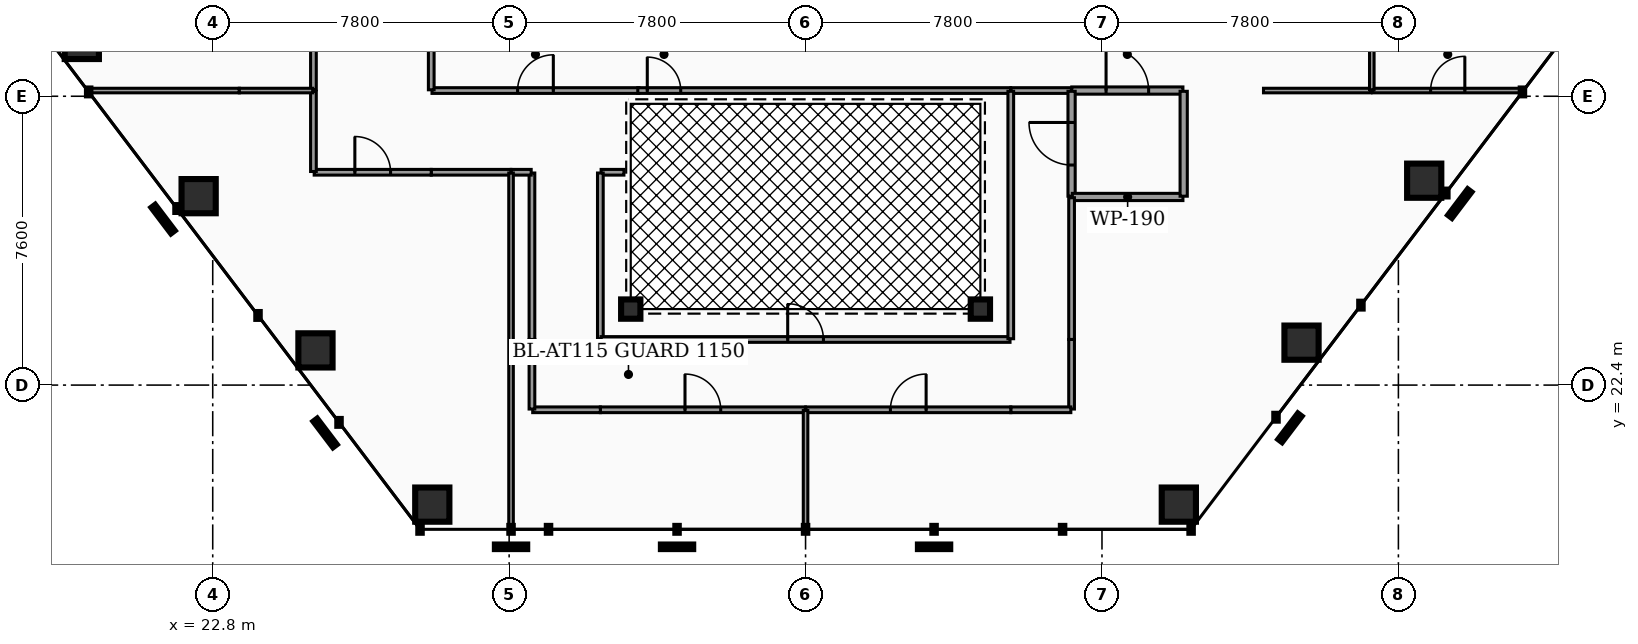
"""IFC4 building model, lengths in metres.
Left out: names, types, materials, properties, quantities, classifications, styles, units other than length and angle.
Written with IfcOpenShell. Run it as: python <this file> out.ifc"""

import sys

from ifc_helpers import new_model, si_unit, direction, frame, frame_2d, origin, origin_2d, place, context, subcontext, project, spatial, rectangle, hollow_rectangle, hollow_circle, extrude, element, fill, save


model = new_model("IFC4")
c1 = context("Model", 3, precision=1e-05, world=origin(), true_north=direction((0.0, 1.0)))
c2 = subcontext(c1, "Body", "Model", "MODEL_VIEW")
j1 = project(units=[si_unit("LENGTHUNIT", "METRE"), si_unit("PLANEANGLEUNIT", "RADIAN")], contexts=[c1])
p1 = place(None, origin())
s1 = spatial("IfcSite", under=j1, at=p1, CompositionType="ELEMENT")
p2 = place(p1, origin())
s2 = spatial("IfcBuilding", under=s1, at=p2, CompositionType="ELEMENT")
p3 = place(p2, frame((0.0, 0.0, 72.42)))
s3 = spatial("IfcBuildingStorey", under=s2, at=p3, CompositionType="ELEMENT", Elevation=72.42)
for number, where, z_axis, x_axis in (
    (1, (19.355, 31.429, 0.0), (0.0, 0.0, 1.0), (1.0, 0.0, 0.0)),
    (2, (22.429, 27.371, 0.0), (0.0, 0.0, 1.0), (1.0, 0.0, 0.0)),
    (3, (25.504, 23.313, 0.0), (0.0, 0.0, 1.0), (1.0, 0.0, 0.0)),
    (4, (28.578, 19.255, 0.0), (0.0, 0.0, 1.0), (1.0, 0.0, 0.0)),
    (5, (48.222, 19.255, 0.0), (0.0, 0.0, 1.0), (1.0, 0.0, 0.0)),
    (6, (51.451, 23.517, 0.0), (0.0, 0.0, 1.0), (1.0, 0.0, 0.0)),
    (7, (54.679, 27.778, 0.0), (0.0, 0.0, 1.0), (1.0, 0.0, 0.0)),
):
    element("IfcColumn", number, at=place(p3, frame(where, z_axis=z_axis, x_axis=x_axis)), inside=s3, PredefinedType="COLUMN", context=c2, shape_type="SweptSolid", body=[
        extrude(hollow_rectangle(XDim=0.9, YDim=0.9, WallThickness=0.045, at=origin_2d()), origin(), (0.0, 0.0, 1.0), 3.82),
    ])
for number, where, z_axis, x_axis in (
    (8, (33.8, 24.4, 0.0), (0.0, 0.0, 1.0), (1.0, 0.0, 0.0)),
    (9, (43.0, 24.4, 0.0), (0.0, 0.0, 1.0), (1.0, 0.0, 0.0)),
):
    element("IfcColumn", number, at=place(p3, frame(where, z_axis=z_axis, x_axis=x_axis)), inside=s3, PredefinedType="COLUMN", context=c2, shape_type="SweptSolid", body=[
        extrude(hollow_circle(Radius=0.254, WallThickness=0.02, at=origin_2d()), origin(), (0.0, 0.0, 1.0), 3.82),
    ])
p4 = place(p3, frame((45.405, 30.15, 0.0), z_axis=(0.0, 0.0, 1.0), x_axis=(1.0, 0.0, 0.0)))
e10 = element("IfcWall", 10, at=p4, inside=s3, PredefinedType="PARTITIONING", context=c2, shape_type="SweptSolid", body=[
    extrude(rectangle(XDim=2.925, YDim=0.19, at=frame_2d((1.462, 0.0))), origin(), (0.0, 0.0, 1.0), 2.777),
])
p5 = place(p4, frame((0.903, 0.0, 0.0)))
e11 = element("IfcOpeningElement", 11, at=p5, cuts=e10, PredefinedType="OPENING", context=c2, shape_type="SweptSolid", body=[
    extrude(rectangle(XDim=1.12, YDim=2.05, at=frame_2d((0.56, 1.025))), frame((0.0, 0.105, 0.0), z_axis=(0.0, -1.0, 0.0), x_axis=(1.0, 0.0, 0.0)), (0.0, 0.0, 1.0), 0.21),
])
p6 = place(p3, frame((43.805, 30.15, 0.0), z_axis=(0.0, 0.0, 1.0), x_axis=(1.0, 0.0, 0.0)))
e12 = element("IfcWall", 12, at=p6, inside=s3, PredefinedType="PARTITIONING", context=c2, shape_type="SweptSolid", body=[
    extrude(rectangle(XDim=1.59, YDim=0.15, at=frame_2d((0.795, 0.0))), origin(), (0.0, 0.0, 1.0), 2.777),
])
p7 = place(p3, frame((28.57, 30.15, 0.0), z_axis=(0.0, 0.0, 1.0), x_axis=(1.0, 0.0, 0.0)))
e13 = element("IfcWall", 13, at=p7, inside=s3, PredefinedType="PARTITIONING", context=c2, shape_type="SweptSolid", body=[
    extrude(rectangle(XDim=5.445, YDim=0.15, at=frame_2d((2.722, 0.0))), origin(), (0.0, 0.0, 1.0), 2.777),
])
p8 = place(p7, frame((2.252, 0.0, 0.0)))
e14 = element("IfcOpeningElement", 14, at=p8, cuts=e13, PredefinedType="OPENING", context=c2, shape_type="SweptSolid", body=[
    extrude(rectangle(XDim=0.94, YDim=2.05, at=frame_2d((0.47, 1.025))), frame((0.0, 0.085, 0.0), z_axis=(0.0, -1.0, 0.0), x_axis=(1.0, 0.0, 0.0)), (0.0, 0.0, 1.0), 0.17),
])
p9 = place(p3, frame((28.55, 30.17, 0.0), z_axis=(0.0, 0.0, 1.0), x_axis=(0.0, 1.0, 0.0)))
e15 = element("IfcWall", 15, at=p9, inside=s3, PredefinedType="PARTITIONING", context=c2, shape_type="SweptSolid", body=[
    extrude(rectangle(XDim=3.065, YDim=0.15, at=frame_2d((1.533, 0.0))), origin(), (0.0, 0.0, 1.0), 2.777),
])
p10 = place(p3, frame((33.985, 30.15, 0.0), z_axis=(0.0, 0.0, 1.0), x_axis=(1.0, 0.0, 0.0)))
e16 = element("IfcWall", 16, at=p10, inside=s3, PredefinedType="PARTITIONING", context=c2, shape_type="SweptSolid", body=[
    extrude(rectangle(XDim=9.81, YDim=0.15, at=frame_2d((4.905, 0.0))), origin(), (0.0, 0.0, 1.0), 2.777),
])
p11 = place(p10, frame((0.25, 0.0, 0.0)))
e17 = element("IfcOpeningElement", 17, at=p11, cuts=e16, PredefinedType="OPENING", context=c2, shape_type="SweptSolid", body=[
    extrude(rectangle(XDim=0.88, YDim=2.05, at=frame_2d((0.44, 1.025))), frame((0.0, 0.085, 0.0), z_axis=(0.0, -1.0, 0.0), x_axis=(1.0, 0.0, 0.0)), (0.0, 0.0, 1.0), 0.17),
])
p12 = place(p3, frame((45.4, 27.37, 0.0), z_axis=(0.0, 0.0, 1.0), x_axis=(0.0, 1.0, 0.0)))
e18 = element("IfcWall", 18, at=p12, inside=s3, PredefinedType="PARTITIONING", context=c2, shape_type="SweptSolid", body=[
    extrude(rectangle(XDim=2.76, YDim=0.19, at=frame_2d((1.38, 0.0))), origin(), (0.0, 0.0, 1.0), 2.777),
])
p13 = place(p12, frame((0.82, 0.0, 0.0)))
e19 = element("IfcOpeningElement", 19, at=p13, cuts=e18, PredefinedType="OPENING", context=c2, shape_type="SweptSolid", body=[
    extrude(rectangle(XDim=1.12, YDim=2.05, at=frame_2d((0.56, 1.025))), frame((0.0, 0.105, 0.0), z_axis=(0.0, -1.0, 0.0), x_axis=(1.0, 0.0, 0.0)), (0.0, 0.0, 1.0), 0.21),
])
p14 = place(p3, frame((45.42, 27.35, 0.0), z_axis=(0.0, 0.0, 1.0), x_axis=(1.0, 0.0, 0.0)))
e20 = element("IfcWall", 20, at=p14, inside=s3, PredefinedType="PARTITIONING", context=c2, shape_type="SweptSolid", body=[
    extrude(rectangle(XDim=2.91, YDim=0.19, at=frame_2d((1.455, 0.0))), origin(), (0.0, 0.0, 1.0), 2.777),
])
p15 = place(p3, frame((48.35, 27.37, 0.0), z_axis=(0.0, 0.0, 1.0), x_axis=(0.0, 1.0, 0.0)))
e21 = element("IfcWall", 21, at=p15, inside=s3, PredefinedType="PARTITIONING", context=c2, shape_type="SweptSolid", body=[
    extrude(rectangle(XDim=2.76, YDim=0.19, at=frame_2d((1.38, 0.0))), origin(), (0.0, 0.0, 1.0), 2.777),
])
p16 = place(p3, frame((33.0, 21.75, 0.0), z_axis=(0.0, 0.0, 1.0), x_axis=(1.0, 0.0, 0.0)))
e22 = element("IfcWall", 22, at=p16, inside=s3, PredefinedType="PARTITIONING", context=c2, shape_type="SweptSolid", body=[
    extrude(rectangle(XDim=5.395, YDim=0.15, at=frame_2d((2.698, 0.0))), origin(), (0.0, 0.0, 1.0), 2.777),
])
p17 = place(p16, frame((2.228, 0.0, 0.0)))
e23 = element("IfcOpeningElement", 23, at=p17, cuts=e22, PredefinedType="OPENING", context=c2, shape_type="SweptSolid", body=[
    extrude(rectangle(XDim=0.94, YDim=2.05, at=frame_2d((0.47, 1.025))), frame((0.0, 0.085, 0.0), z_axis=(0.0, -1.0, 0.0), x_axis=(1.0, 0.0, 0.0)), (0.0, 0.0, 1.0), 0.17),
])
p18 = place(p3, frame((31.22, 21.75, 0.0), z_axis=(0.0, 0.0, 1.0), x_axis=(1.0, 0.0, 0.0)))
e24 = element("IfcWall", 24, at=p18, inside=s3, PredefinedType="PARTITIONING", context=c2, shape_type="SweptSolid", body=[
    extrude(rectangle(XDim=1.78, YDim=0.15, at=frame_2d((0.89, 0.0))), origin(), (0.0, 0.0, 1.0), 2.777),
])
p19 = place(p3, frame((31.2, 21.77, 0.0), z_axis=(0.0, 0.0, 1.0), x_axis=(0.0, 1.0, 0.0)))
e25 = element("IfcWall", 25, at=p19, inside=s3, PredefinedType="PARTITIONING", context=c2, shape_type="SweptSolid", body=[
    extrude(rectangle(XDim=1.83, YDim=0.15, at=frame_2d((0.915, 0.0))), origin(), (0.0, 0.0, 1.0), 2.777),
])
p20 = place(p3, frame((31.2, 23.6, 0.0), z_axis=(0.0, 0.0, 1.0), x_axis=(0.0, 1.0, 0.0)))
e26 = element("IfcWall", 26, at=p20, inside=s3, PredefinedType="PARTITIONING", context=c2, shape_type="SweptSolid", body=[
    extrude(rectangle(XDim=4.38, YDim=0.15, at=frame_2d((2.19, 0.0))), origin(), (0.0, 0.0, 1.0), 2.777),
])
p21 = place(p3, frame((30.655, 28.0, 0.0), z_axis=(0.0, 0.0, 1.0), x_axis=(1.0, 0.0, 0.0)))
e27 = element("IfcWall", 27, at=p21, inside=s3, PredefinedType="PARTITIONING", context=c2, shape_type="SweptSolid", body=[
    extrude(rectangle(XDim=0.525, YDim=0.15, at=frame_2d((0.262, 0.0))), origin(), (0.0, 0.0, 1.0), 2.777),
])
p22 = place(p3, frame((45.4, 23.6, 0.0), z_axis=(0.0, 0.0, 1.0), x_axis=(0.0, 1.0, 0.0)))
e28 = element("IfcWall", 28, at=p22, inside=s3, PredefinedType="PARTITIONING", context=c2, shape_type="SweptSolid", body=[
    extrude(rectangle(XDim=3.73, YDim=0.15, at=frame_2d((1.865, 0.0))), origin(), (0.0, 0.0, 1.0), 2.777),
])
p23 = place(p3, frame((45.4, 21.77, 0.0), z_axis=(0.0, 0.0, 1.0), x_axis=(0.0, 1.0, 0.0)))
e29 = element("IfcWall", 29, at=p23, inside=s3, PredefinedType="PARTITIONING", context=c2, shape_type="SweptSolid", body=[
    extrude(rectangle(XDim=1.83, YDim=0.15, at=frame_2d((0.915, 0.0))), origin(), (0.0, 0.0, 1.0), 2.777),
])
p24 = place(p3, frame((43.8, 21.75, 0.0), z_axis=(0.0, 0.0, 1.0), x_axis=(1.0, 0.0, 0.0)))
e30 = element("IfcWall", 30, at=p24, inside=s3, PredefinedType="PARTITIONING", context=c2, shape_type="SweptSolid", body=[
    extrude(rectangle(XDim=1.58, YDim=0.15, at=frame_2d((0.79, 0.0))), origin(), (0.0, 0.0, 1.0), 2.777),
])
p25 = place(p3, frame((38.405, 21.75, 0.0), z_axis=(0.0, 0.0, 1.0), x_axis=(1.0, 0.0, 0.0)))
e31 = element("IfcWall", 31, at=p25, inside=s3, PredefinedType="PARTITIONING", context=c2, shape_type="SweptSolid", body=[
    extrude(rectangle(XDim=5.395, YDim=0.15, at=frame_2d((2.698, 0.0))), origin(), (0.0, 0.0, 1.0), 2.777),
])
p26 = place(p25, frame((2.228, 0.0, 0.0)))
e32 = element("IfcOpeningElement", 32, at=p26, cuts=e31, PredefinedType="OPENING", context=c2, shape_type="SweptSolid", body=[
    extrude(rectangle(XDim=0.94, YDim=2.05, at=frame_2d((0.47, 1.025))), frame((0.0, 0.085, 0.0), z_axis=(0.0, -1.0, 0.0), x_axis=(1.0, 0.0, 0.0)), (0.0, 0.0, 1.0), 0.17),
])
p27 = place(p3, frame((28.55, 28.0, 0.0), z_axis=(0.0, 0.0, 1.0), x_axis=(1.0, 0.0, 0.0)))
e33 = element("IfcWall", 33, at=p27, inside=s3, PredefinedType="PARTITIONING", context=c2, shape_type="SweptSolid", body=[
    extrude(rectangle(XDim=2.095, YDim=0.15, at=frame_2d((1.047, 0.0))), origin(), (0.0, 0.0, 1.0), 2.777),
])
p28 = place(p3, frame((25.47, 28.0, 0.0), z_axis=(0.0, 0.0, 1.0), x_axis=(1.0, 0.0, 0.0)))
e34 = element("IfcWall", 34, at=p28, inside=s3, PredefinedType="PARTITIONING", context=c2, shape_type="SweptSolid", body=[
    extrude(rectangle(XDim=3.08, YDim=0.15, at=frame_2d((1.54, 0.0))), origin(), (0.0, 0.0, 1.0), 2.777),
])
p29 = place(p28, frame((1.07, 0.0, 0.0)))
e35 = element("IfcOpeningElement", 35, at=p29, cuts=e34, PredefinedType="OPENING", context=c2, shape_type="SweptSolid", body=[
    extrude(rectangle(XDim=0.94, YDim=2.05, at=frame_2d((0.47, 1.025))), frame((0.0, 0.085, 0.0), z_axis=(0.0, -1.0, 0.0), x_axis=(1.0, 0.0, 0.0)), (0.0, 0.0, 1.0), 0.17),
])
p30 = place(p3, frame((25.45, 28.02, 0.0), z_axis=(0.0, 0.0, 1.0), x_axis=(0.0, 1.0, 0.0)))
e36 = element("IfcWall", 36, at=p30, inside=s3, PredefinedType="PARTITIONING", context=c2, shape_type="SweptSolid", body=[
    extrude(rectangle(XDim=2.11, YDim=0.15, at=frame_2d((1.055, 0.0))), origin(), (0.0, 0.0, 1.0), 2.777),
])
p31 = place(p3, frame((25.45, 30.17, 0.0), z_axis=(0.0, 0.0, 1.0), x_axis=(0.0, 1.0, 0.0)))
e37 = element("IfcWall", 37, at=p31, inside=s3, PredefinedType="PARTITIONING", context=c2, shape_type="SweptSolid", body=[
    extrude(rectangle(XDim=3.115, YDim=0.15, at=frame_2d((1.558, 0.0))), origin(), (0.0, 0.0, 1.0), 2.777),
])
p32 = place(p31, frame((1.087, 0.0, 0.0)))
e38 = element("IfcOpeningElement", 38, at=p32, cuts=e37, PredefinedType="OPENING", context=c2, shape_type="SweptSolid", body=[
    extrude(rectangle(XDim=0.94, YDim=2.05, at=frame_2d((0.47, 1.025))), frame((0.0, 0.085, 0.0), z_axis=(0.0, -1.0, 0.0), x_axis=(1.0, 0.0, 0.0)), (0.0, 0.0, 1.0), 0.17),
])
p33 = place(p3, frame((33.02, 28.0, 0.0), z_axis=(0.0, 0.0, 1.0), x_axis=(1.0, 0.0, 0.0)))
e39 = element("IfcWall", 39, at=p33, inside=s3, PredefinedType="PARTITIONING", context=c2, shape_type="SweptSolid", body=[
    extrude(rectangle(XDim=0.6, YDim=0.15, at=frame_2d((0.3, 0.0))), origin(), (0.0, 0.0, 1.0), 2.777),
])
p34 = place(p3, frame((33.0, 23.62, 0.0), z_axis=(0.0, 0.0, 1.0), x_axis=(0.0, 1.0, 0.0)))
e40 = element("IfcWall", 40, at=p34, inside=s3, PredefinedType="PARTITIONING", context=c2, shape_type="SweptSolid", body=[
    extrude(rectangle(XDim=4.36, YDim=0.15, at=frame_2d((2.18, 0.0))), origin(), (0.0, 0.0, 1.0), 2.777),
])
p35 = place(p3, frame((33.02, 23.6, 0.0), z_axis=(0.0, 0.0, 1.0), x_axis=(1.0, 0.0, 0.0)))
e41 = element("IfcWall", 41, at=p35, inside=s3, PredefinedType="PARTITIONING", context=c2, shape_type="SweptSolid", body=[
    extrude(rectangle(XDim=10.76, YDim=0.15, at=frame_2d((5.38, 0.0))), origin(), (0.0, 0.0, 1.0), 2.777),
])
p36 = place(p35, frame((4.91, 0.0, 0.0)))
e42 = element("IfcOpeningElement", 42, at=p36, cuts=e41, PredefinedType="OPENING", context=c2, shape_type="SweptSolid", body=[
    extrude(rectangle(XDim=0.94, YDim=2.05, at=frame_2d((0.47, 1.025))), frame((0.0, 0.085, 0.0), z_axis=(0.0, -1.0, 0.0), x_axis=(1.0, 0.0, 0.0)), (0.0, 0.0, 1.0), 0.17),
])
p37 = place(p3, frame((43.8, 23.62, 0.0), z_axis=(0.0, 0.0, 1.0), x_axis=(0.0, 1.0, 0.0)))
e43 = element("IfcWall", 43, at=p37, inside=s3, PredefinedType="PARTITIONING", context=c2, shape_type="SweptSolid", body=[
    extrude(rectangle(XDim=6.51, YDim=0.15, at=frame_2d((3.255, 0.0))), origin(), (0.0, 0.0, 1.0), 2.777),
])
p38 = place(p3, frame((38.4, 18.62, 0.0), z_axis=(0.0, 0.0, 1.0), x_axis=(0.0, 1.0, 0.0)))
e44 = element("IfcWall", 44, at=p38, inside=s3, PredefinedType="PARTITIONING", context=c2, shape_type="SweptSolid", body=[
    extrude(rectangle(XDim=3.11, YDim=0.12, at=frame_2d((1.555, 0.0))), origin(), (0.0, 0.0, 1.0), 2.777),
])
p39 = place(p3, frame((30.65, 18.62, 0.0), z_axis=(0.0, 0.0, 1.0), x_axis=(0.0, 1.0, 0.0)))
e45 = element("IfcWall", 45, at=p39, inside=s3, PredefinedType="PARTITIONING", context=c2, shape_type="SweptSolid", body=[
    extrude(rectangle(XDim=9.36, YDim=0.12, at=frame_2d((4.68, 0.0))), origin(), (0.0, 0.0, 1.0), 2.777),
])
p40 = place(p3, frame((53.32, 30.15, 0.0), z_axis=(0.0, 0.0, 1.0), x_axis=(1.0, 0.0, 0.0)))
e46 = element("IfcWall", 46, at=p40, inside=s3, PredefinedType="PARTITIONING", context=c2, shape_type="SweptSolid", body=[
    extrude(rectangle(XDim=3.956, YDim=0.12, at=frame_2d((1.978, 0.0))), origin(), (0.0, 0.0, 1.0), 2.777),
])
p41 = place(p40, frame((1.528, 0.0, 0.0)))
e47 = element("IfcOpeningElement", 47, at=p41, cuts=e46, PredefinedType="OPENING", context=c2, shape_type="SweptSolid", body=[
    extrude(rectangle(XDim=0.9, YDim=2.05, at=frame_2d((0.45, 1.025))), frame((0.0, 0.07, 0.0), z_axis=(0.0, -1.0, 0.0), x_axis=(1.0, 0.0, 0.0)), (0.0, 0.0, 1.0), 0.14),
])
p42 = place(p3, frame((50.45, 30.15, 0.0), z_axis=(0.0, 0.0, 1.0), x_axis=(1.0, 0.0, 0.0)))
e48 = element("IfcWall", 48, at=p42, inside=s3, PredefinedType="PARTITIONING", context=c2, shape_type="SweptSolid", body=[
    extrude(rectangle(XDim=2.83, YDim=0.12, at=frame_2d((1.415, 0.0))), origin(), (0.0, 0.0, 1.0), 2.777),
])
p43 = place(p3, frame((19.524, 30.15, 0.0), z_axis=(0.0, 0.0, 1.0), x_axis=(1.0, 0.0, 0.0)))
e49 = element("IfcWall", 49, at=p43, inside=s3, PredefinedType="PARTITIONING", context=c2, shape_type="SweptSolid", body=[
    extrude(rectangle(XDim=3.976, YDim=0.12, at=frame_2d((1.988, 0.0))), origin(), (0.0, 0.0, 1.0), 2.777),
])
p44 = place(p3, frame((23.5, 30.15, 0.0), z_axis=(0.0, 0.0, 1.0), x_axis=(1.0, 0.0, 0.0)))
e50 = element("IfcWall", 50, at=p44, inside=s3, PredefinedType="PARTITIONING", context=c2, shape_type="SweptSolid", body=[
    extrude(rectangle(XDim=1.93, YDim=0.12, at=frame_2d((0.965, 0.0))), origin(), (0.0, 0.0, 1.0), 2.777),
])
p45 = place(p3, frame((53.3, 30.17, 0.0), z_axis=(0.0, 0.0, 1.0), x_axis=(0.0, 1.0, 0.0)))
e51 = element("IfcWall", 51, at=p45, inside=s3, PredefinedType="PARTITIONING", context=c2, shape_type="SweptSolid", body=[
    extrude(rectangle(XDim=17.537, YDim=0.12, at=frame_2d((8.769, 0.0))), origin(), (0.0, 0.0, 1.0), 2.777),
])
p46 = place(p5, origin())
e52 = element("IfcDoor", 52, at=p46, inside=s3, OperationType="SINGLE_SWING_LEFT", PredefinedType="DOOR", context=c2, shape_type="SweptSolid", body=[
    extrude(rectangle(XDim=1.12, YDim=2.05, at=frame_2d((0.56, 1.025))), frame((0.0, 0.025, 0.0), z_axis=(0.0, -1.0, 0.0), x_axis=(1.0, 0.0, 0.0)), (0.0, 0.0, 1.0), 0.05),
])
fill(e11, e52)
p47 = place(p8, origin())
e53 = element("IfcDoor", 53, at=p47, inside=s3, OperationType="SINGLE_SWING_RIGHT", PredefinedType="DOOR", context=c2, shape_type="SweptSolid", body=[
    extrude(rectangle(XDim=0.94, YDim=2.05, at=frame_2d((0.47, 1.025))), frame((0.0, 0.025, 0.0), z_axis=(0.0, -1.0, 0.0), x_axis=(1.0, 0.0, 0.0)), (0.0, 0.0, 1.0), 0.05),
])
fill(e14, e53)
p48 = place(p11, origin())
e54 = element("IfcDoor", 54, at=p48, inside=s3, OperationType="SINGLE_SWING_LEFT", PredefinedType="DOOR", context=c2, shape_type="SweptSolid", body=[
    extrude(rectangle(XDim=0.88, YDim=2.05, at=frame_2d((0.44, 1.025))), frame((0.0, 0.025, 0.0), z_axis=(0.0, -1.0, 0.0), x_axis=(1.0, 0.0, 0.0)), (0.0, 0.0, 1.0), 0.05),
])
fill(e17, e54)
p49 = place(p13, origin())
e55 = element("IfcDoor", 55, at=p49, inside=s3, OperationType="SINGLE_SWING_RIGHT", PredefinedType="DOOR", context=c2, shape_type="SweptSolid", body=[
    extrude(rectangle(XDim=1.12, YDim=2.05, at=frame_2d((0.56, 1.025))), frame((0.0, 0.025, 0.0), z_axis=(0.0, -1.0, 0.0), x_axis=(1.0, 0.0, 0.0)), (0.0, 0.0, 1.0), 0.05),
])
fill(e19, e55)
p50 = place(p17, origin())
e56 = element("IfcDoor", 56, at=p50, inside=s3, OperationType="SINGLE_SWING_LEFT", PredefinedType="DOOR", context=c2, shape_type="SweptSolid", body=[
    extrude(rectangle(XDim=0.94, YDim=2.05, at=frame_2d((0.47, 1.025))), frame((0.0, 0.025, 0.0), z_axis=(0.0, -1.0, 0.0), x_axis=(1.0, 0.0, 0.0)), (0.0, 0.0, 1.0), 0.05),
])
fill(e23, e56)
p51 = place(p26, origin())
e57 = element("IfcDoor", 57, at=p51, inside=s3, OperationType="SINGLE_SWING_RIGHT", PredefinedType="DOOR", context=c2, shape_type="SweptSolid", body=[
    extrude(rectangle(XDim=0.94, YDim=2.05, at=frame_2d((0.47, 1.025))), frame((0.0, 0.025, 0.0), z_axis=(0.0, -1.0, 0.0), x_axis=(1.0, 0.0, 0.0)), (0.0, 0.0, 1.0), 0.05),
])
fill(e32, e57)
p52 = place(p29, origin())
e58 = element("IfcDoor", 58, at=p52, inside=s3, OperationType="SINGLE_SWING_LEFT", PredefinedType="DOOR", context=c2, shape_type="SweptSolid", body=[
    extrude(rectangle(XDim=0.94, YDim=2.05, at=frame_2d((0.47, 1.025))), frame((0.0, 0.025, 0.0), z_axis=(0.0, -1.0, 0.0), x_axis=(1.0, 0.0, 0.0)), (0.0, 0.0, 1.0), 0.05),
])
fill(e35, e58)
p53 = place(p36, origin())
e59 = element("IfcDoor", 59, at=p53, inside=s3, OperationType="SINGLE_SWING_LEFT", PredefinedType="DOOR", context=c2, shape_type="SweptSolid", body=[
    extrude(rectangle(XDim=0.94, YDim=2.05, at=frame_2d((0.47, 1.025))), frame((0.0, 0.025, 0.0), z_axis=(0.0, -1.0, 0.0), x_axis=(1.0, 0.0, 0.0)), (0.0, 0.0, 1.0), 0.05),
])
fill(e42, e59)
p54 = place(p41, origin())
e60 = element("IfcDoor", 60, at=p54, inside=s3, OperationType="SINGLE_SWING_RIGHT", PredefinedType="DOOR", context=c2, shape_type="SweptSolid", body=[
    extrude(rectangle(XDim=0.9, YDim=2.05, at=frame_2d((0.45, 1.025))), frame((0.0, 0.025, 0.0), z_axis=(0.0, -1.0, 0.0), x_axis=(1.0, 0.0, 0.0)), (0.0, 0.0, 1.0), 0.05),
])
fill(e47, e60)
save(model, sys.argv[1])
